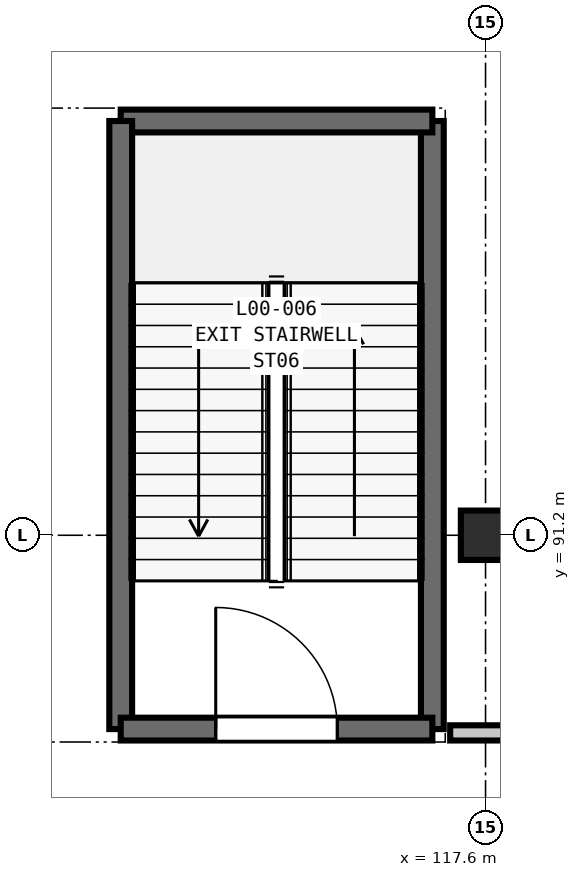
"""IFC4 building model, lengths in metres.
Left out: names, types, materials, properties, quantities, classifications, styles, units other than length and angle.
Written with IfcOpenShell. Run it as: python <this file> out.ifc"""

import sys

from ifc_helpers import new_model, si_unit, direction, frame, frame_2d, origin, origin_2d, place, context, subcontext, project, spatial, rectangle, extrude, element, fill, save


model = new_model("IFC4")
c1 = context("Model", 3, precision=1e-05, world=origin(), true_north=direction((0.0, 1.0)))
c2 = subcontext(c1, "Body", "Model", "MODEL_VIEW")
j1 = project(units=[si_unit("LENGTHUNIT", "METRE"), si_unit("PLANEANGLEUNIT", "RADIAN")], contexts=[c1])
p1 = place(None, origin())
s1 = spatial("IfcSite", under=j1, at=p1, CompositionType="ELEMENT")
p2 = place(p1, origin())
s2 = spatial("IfcBuilding", under=s1, at=p2, CompositionType="ELEMENT")
p3 = place(p2, origin())
s3 = spatial("IfcBuildingStorey", under=s2, at=p3, CompositionType="ELEMENT", Elevation=0.0)
p4 = place(p3, frame((117.6, 91.2, 0.0), z_axis=(0.0, 0.0, 1.0), x_axis=(1.0, 0.0, 0.0)))
e1 = element("IfcColumn", 1, at=p4, inside=s3, PredefinedType="COLUMN", context=c2, shape_type="SweptSolid", body=[
    extrude(rectangle(XDim=0.65, YDim=0.65, at=origin_2d()), origin(), (0.0, 0.0, 1.0), 5.4),
])
p5 = place(p3, frame((116.9, 88.65, 0.0), z_axis=(0.0, 0.0, 1.0), x_axis=(0.0, 1.0, 0.0)))
e2 = element("IfcWall", 2, at=p5, inside=s3, PredefinedType="SHEAR", context=c2, shape_type="SweptSolid", body=[
    extrude(rectangle(XDim=8.0, YDim=0.3, at=frame_2d((4.0, 0.0))), origin(), (0.0, 0.0, 1.0), 5.4),
])
p6 = place(p3, frame((116.9, 96.65, 0.0), z_axis=(0.0, 0.0, 1.0), x_axis=(-1.0, 0.0, 0.0)))
e3 = element("IfcWall", 3, at=p6, inside=s3, PredefinedType="SHEAR", context=c2, shape_type="SweptSolid", body=[
    extrude(rectangle(XDim=4.1, YDim=0.3, at=frame_2d((2.05, 0.0))), origin(), (0.0, 0.0, 1.0), 5.4),
])
p7 = place(p3, frame((112.8, 96.65, 0.0), z_axis=(0.0, 0.0, 1.0), x_axis=(0.0, -1.0, 0.0)))
e4 = element("IfcWall", 4, at=p7, inside=s3, PredefinedType="SHEAR", context=c2, shape_type="SweptSolid", body=[
    extrude(rectangle(XDim=8.0, YDim=0.3, at=frame_2d((4.0, 0.0))), origin(), (0.0, 0.0, 1.0), 5.4),
])
p8 = place(p3, frame((112.8, 88.65, 0.0), z_axis=(0.0, 0.0, 1.0), x_axis=(1.0, 0.0, 0.0)))
e5 = element("IfcWall", 5, at=p8, inside=s3, PredefinedType="SHEAR", context=c2, shape_type="SweptSolid", body=[
    extrude(rectangle(XDim=4.1, YDim=0.3, at=frame_2d((2.05, 0.0))), origin(), (0.0, 0.0, 1.0), 5.4),
])
p9 = place(p8, frame((1.25, 0.0, 0.0)))
e6 = element("IfcOpeningElement", 6, at=p9, cuts=e5, PredefinedType="OPENING", context=c2, shape_type="SweptSolid", body=[
    extrude(rectangle(XDim=1.6, YDim=2.25, at=frame_2d((0.8, 1.125))), frame((0.0, 0.16, 0.0), z_axis=(0.0, -1.0, 0.0), x_axis=(1.0, 0.0, 0.0)), (0.0, 0.0, 1.0), 0.32),
])
p10 = place(p3, frame((117.135, 88.6, 0.0), z_axis=(0.0, 0.0, 1.0), x_axis=(1.0, 0.0, 0.0)))
e7 = element("IfcWall", 7, at=p10, inside=s3, PredefinedType="PARTITIONING", context=c2, shape_type="SweptSolid", body=[
    extrude(rectangle(XDim=8.265, YDim=0.2, at=frame_2d((4.133, 0.0))), origin(), (0.0, 0.0, 1.0), 5.04),
])
p11 = place(p10, frame((3.408, 0.0, 0.0)))
e8 = element("IfcOpeningElement", 8, at=p11, cuts=e7, PredefinedType="OPENING", context=c2, shape_type="SweptSolid", body=[
    extrude(rectangle(XDim=1.45, YDim=2.25, at=frame_2d((0.725, 1.125))), frame((0.0, 0.11, 0.0), z_axis=(0.0, -1.0, 0.0), x_axis=(1.0, 0.0, 0.0)), (0.0, 0.0, 1.0), 0.22),
])
p12 = place(p9, origin())
e9 = element("IfcDoor", 9, at=p12, inside=s3, OperationType="SINGLE_SWING_LEFT", PredefinedType="DOOR", context=c2, shape_type="SweptSolid", body=[
    extrude(rectangle(XDim=1.6, YDim=2.25, at=frame_2d((0.8, 1.125))), frame((0.0, 0.025, 0.0), z_axis=(0.0, -1.0, 0.0), x_axis=(1.0, 0.0, 0.0)), (0.0, 0.0, 1.0), 0.05),
])
fill(e6, e9)
save(model, sys.argv[1])
